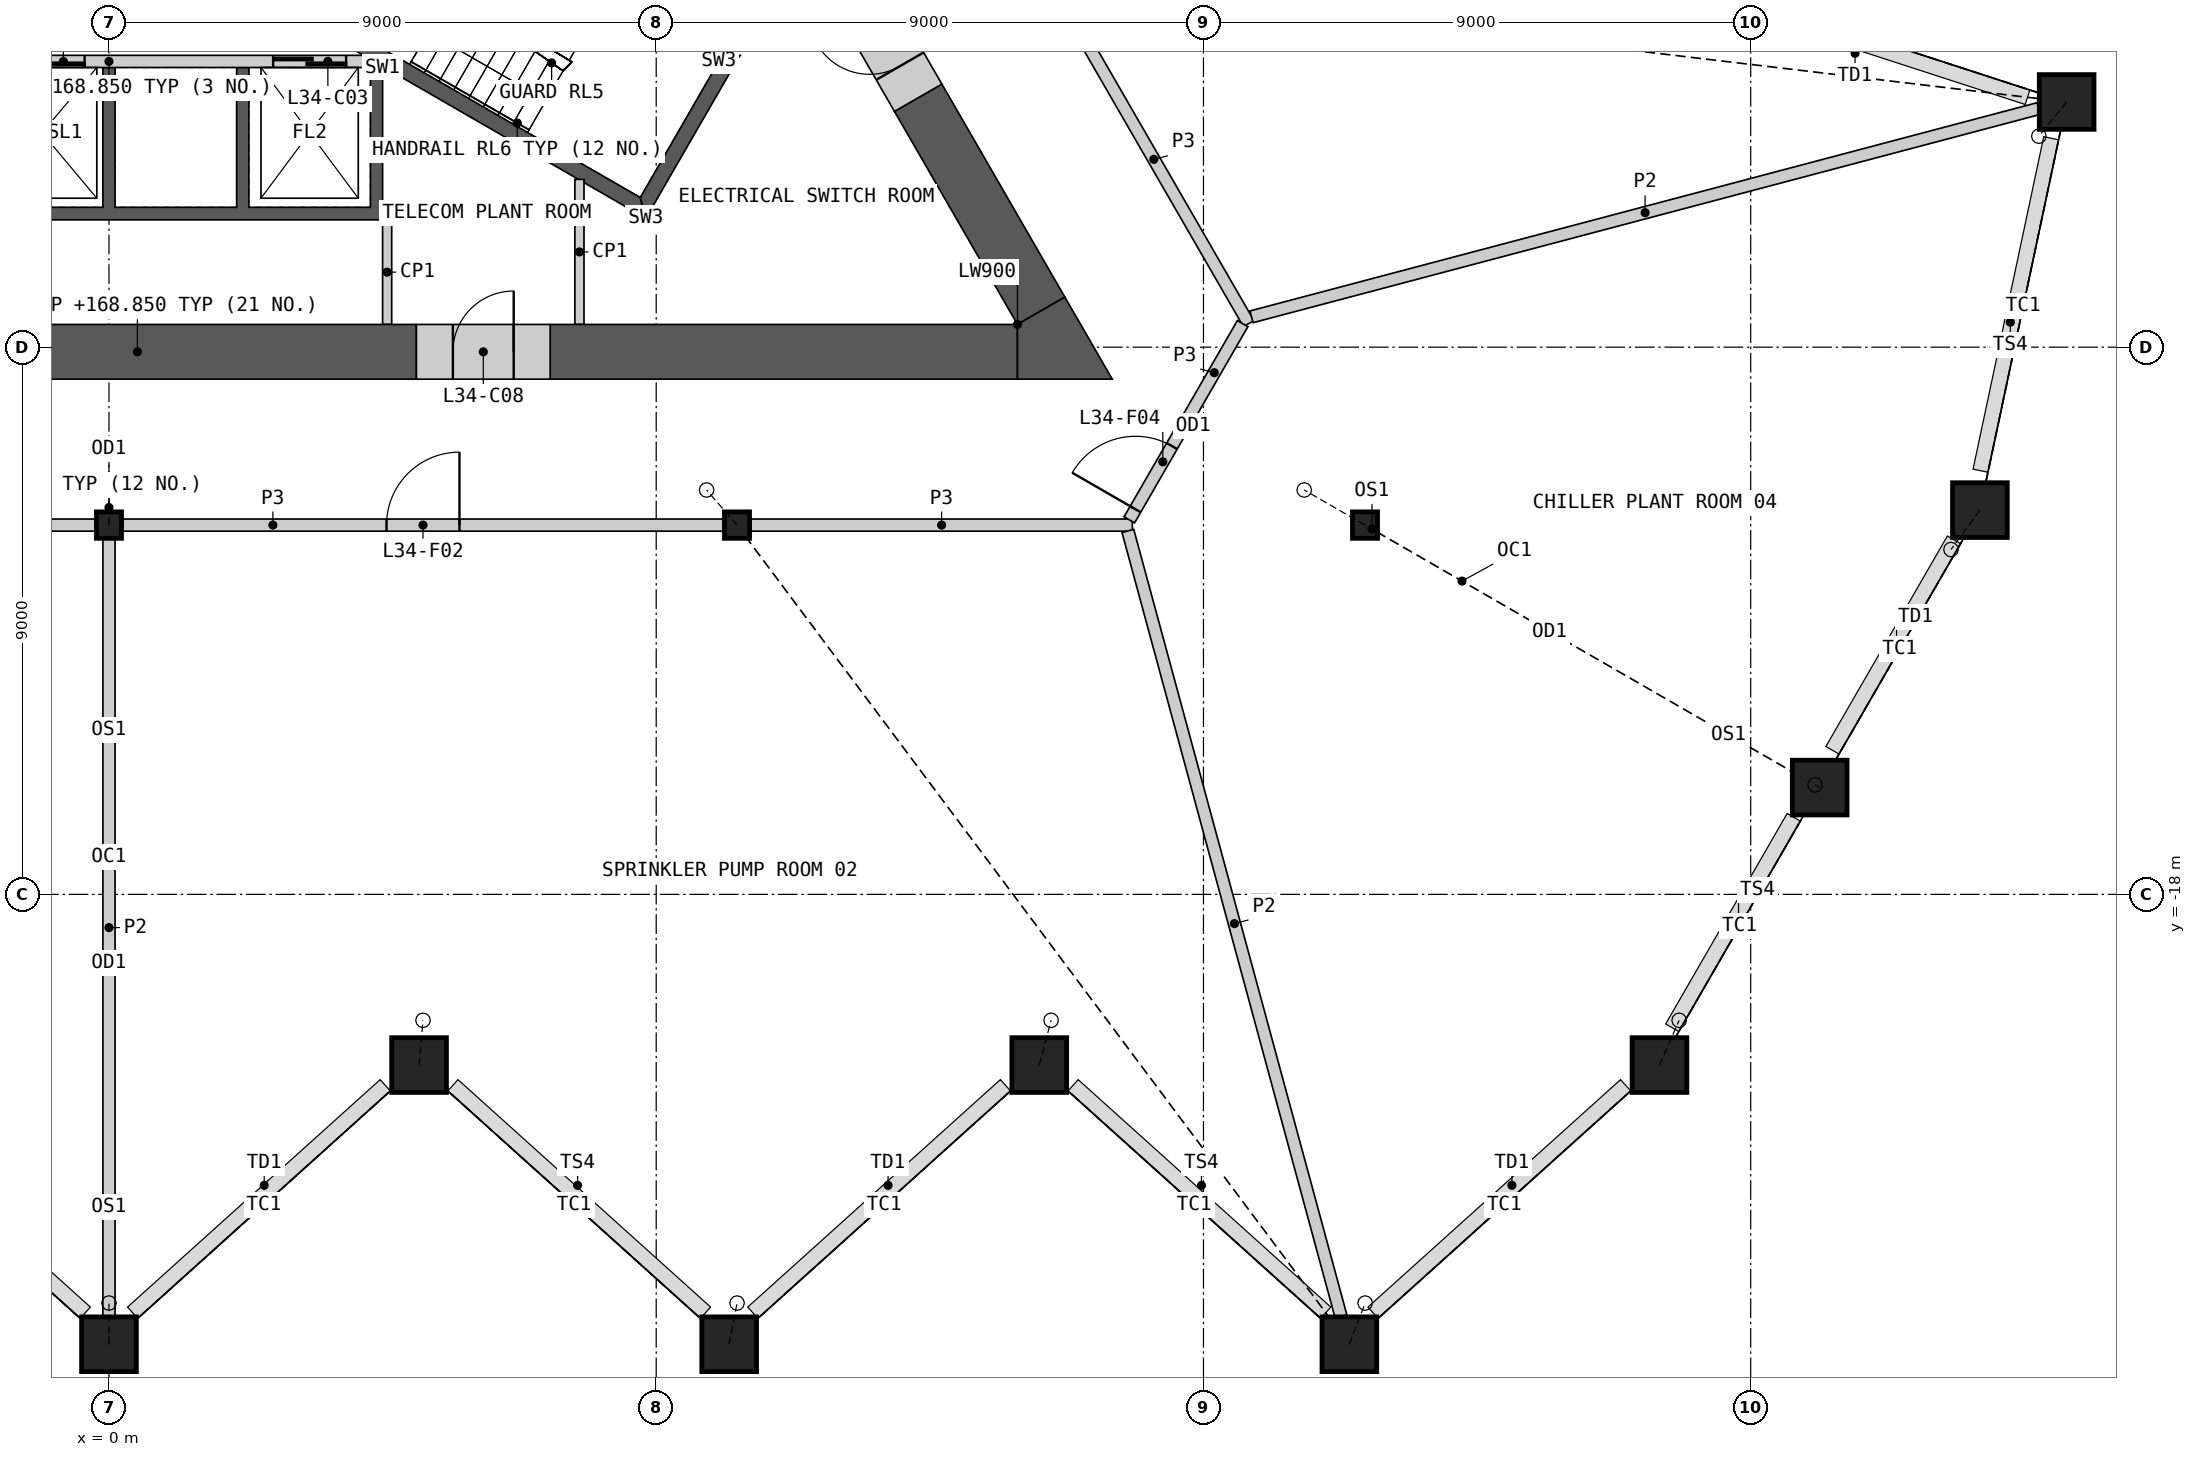
"""IFC4 building model, lengths in metres.
Left out: names, types, materials, properties, quantities, classifications, styles, units other than length and angle.
Written with IfcOpenShell. Run it as: python <this file> out.ifc"""

import sys

from ifc_helpers import new_model, si_unit, direction, frame, frame_2d, origin, origin_2d, place, context, subcontext, project, spatial, polyline, rectangle, hollow_rectangle, i_section, outline, extrude, element, fill, save


model = new_model("IFC4")
c1 = context("Model", 3, precision=1e-05, world=origin(), true_north=direction((0.0, 1.0)))
c2 = subcontext(c1, "Body", "Model", "MODEL_VIEW")
j1 = project(units=[si_unit("LENGTHUNIT", "METRE"), si_unit("PLANEANGLEUNIT", "RADIAN")], contexts=[c1])
p1 = place(None, origin())
s1 = spatial("IfcSite", under=j1, at=p1, CompositionType="ELEMENT")
p2 = place(p1, origin())
s2 = spatial("IfcBuilding", under=s1, at=p2, CompositionType="ELEMENT")
p3 = place(p2, frame((0.0, 0.0, 164.2)))
s3 = spatial("IfcBuildingStorey", under=s2, at=p3, CompositionType="ELEMENT", Elevation=164.2)
p4 = place(p3, frame((0.0, -25.399, 0.0), z_axis=(0.0, 0.134271063417, 0.990944641001), x_axis=(-1.0, 0.0, 0.0)))
e1 = element("IfcColumn", 1, at=p4, inside=s3, PredefinedType="COLUMN", context=c2, shape_type="SweptSolid", body=[
    extrude(hollow_rectangle(XDim=0.9, YDim=0.9, WallThickness=0.06, at=origin_2d()), frame((0.0, 0.0, 0.061)), (0.0, 0.0, 1.0), 4.924),
])
p5 = place(p3, frame((5.1, -20.807, 0.0), z_axis=(0.012848812001, 0.145587666803, 0.989261916433), x_axis=(-0.996128147691, 0.087913101289, 0.0)))
e2 = element("IfcColumn", 2, at=p5, inside=s3, PredefinedType="COLUMN", context=c2, shape_type="SweptSolid", body=[
    extrude(hollow_rectangle(XDim=0.9, YDim=0.9, WallThickness=0.06, at=origin_2d()), frame((0.0, 0.0, 0.066)), (0.0, 0.0, 1.0), 4.921),
])
p6 = place(p3, frame((10.2, -25.399, 0.0), z_axis=(0.025636135128, 0.134226933927, 0.990618957412), x_axis=(-0.982245501071, 0.187600041646, 0.0)))
e3 = element("IfcColumn", 3, at=p6, inside=s3, PredefinedType="COLUMN", context=c2, shape_type="SweptSolid", body=[
    extrude(hollow_rectangle(XDim=0.9, YDim=0.9, WallThickness=0.06, at=origin_2d()), frame((0.0, 0.0, 0.062)), (0.0, 0.0, 1.0), 4.923),
])
p7 = place(p3, frame((15.3, -20.807, 0.0), z_axis=(0.038424605206, 0.145492160916, 0.988612958051), x_axis=(-0.966849777203, 0.255345860204, 0.0)))
e4 = element("IfcColumn", 4, at=p7, inside=s3, PredefinedType="COLUMN", context=c2, shape_type="SweptSolid", body=[
    extrude(hollow_rectangle(XDim=0.9, YDim=0.9, WallThickness=0.06, at=origin_2d()), frame((0.0, 0.0, 0.069)), (0.0, 0.0, 1.0), 4.921),
])
p8 = place(p3, frame((20.4, -25.399, 0.0), z_axis=(0.051318190418, 0.13409414163, 0.989638926333), x_axis=(-0.93394282344, 0.3574224427, 0.0)))
e5 = element("IfcColumn", 5, at=p8, inside=s3, PredefinedType="COLUMN", context=c2, shape_type="SweptSolid", body=[
    extrude(hollow_rectangle(XDim=0.9, YDim=0.9, WallThickness=0.06, at=origin_2d()), frame((0.0, 0.0, 0.065)), (0.0, 0.0, 1.0), 4.922),
])
p9 = place(p3, frame((25.5, -20.807, 0.0), z_axis=(0.063925118443, 0.145301890638, 0.987320079715), x_axis=(-0.915332943749, 0.402697904251, 0.0)))
e6 = element("IfcColumn", 6, at=p9, inside=s3, PredefinedType="COLUMN", context=c2, shape_type="SweptSolid", body=[
    extrude(hollow_rectangle(XDim=0.9, YDim=0.9, WallThickness=0.06, at=origin_2d()), frame((0.0, 0.0, 0.072)), (0.0, 0.0, 1.0), 4.919),
])
p10 = place(p3, frame((28.135, -16.243, 0.0), z_axis=(-0.015134407055, 0.008738899558, 0.999847279017), x_axis=(-0.500044870432, -0.865999496279, 0.0)))
e7 = element("IfcColumn", 7, at=p10, inside=s3, PredefinedType="COLUMN", context=c2, shape_type="SweptSolid", body=[
    extrude(hollow_rectangle(XDim=0.9, YDim=0.9, WallThickness=0.06, at=origin_2d()), frame((0.0, 0.0, 0.008)), (0.0, 0.0, 1.0), 4.985),
])
p11 = place(p3, frame((30.769, -11.68, 0.0), z_axis=(-0.093862608604, -0.128042675117, 0.987317012947), x_axis=(0.806511174803, -0.59121884689, 0.0)))
e8 = element("IfcColumn", 8, at=p11, inside=s3, PredefinedType="COLUMN", context=c2, shape_type="SweptSolid", body=[
    extrude(hollow_rectangle(XDim=0.9, YDim=0.9, WallThickness=0.06, at=origin_2d()), frame((0.0, 0.0, 0.072)), (0.0, 0.0, 1.0), 4.919),
])
p12 = place(p3, frame((32.196, -4.967, 0.0), z_axis=(-0.090507303602, -0.111479097389, 0.989636720641), x_axis=(0.776350696847, -0.630301194276, 0.0)))
e9 = element("IfcColumn", 9, at=p12, inside=s3, PredefinedType="COLUMN", context=c2, shape_type="SweptSolid", body=[
    extrude(hollow_rectangle(XDim=0.9, YDim=0.9, WallThickness=0.06, at=origin_2d()), frame((0.0, 0.0, 0.065)), (0.0, 0.0, 1.0), 4.922),
])
p13 = place(p3, frame((0.0, -11.926, 0.0), z_axis=(0.0, 0.114716162252, 0.993398309903), x_axis=(-1.0, 0.0, 0.0)))
e10 = element("IfcColumn", 10, at=p13, inside=s3, PredefinedType="COLUMN", context=c2, shape_type="SweptSolid", body=[
    extrude(i_section(OverallWidth=0.412, OverallDepth=0.435, WebThickness=0.036, FlangeThickness=0.057, at=origin_2d()), frame((0.0, 0.0, 0.025)), (0.0, 0.0, 1.0), 4.983),
])
p14 = place(p3, frame((10.328, -11.926, 0.0), z_axis=(-0.098853266559, 0.114154284869, 0.988532665589), x_axis=(-0.755952685413, -0.654626257812, 0.0)))
e11 = element("IfcColumn", 11, at=p14, inside=s3, PredefinedType="COLUMN", context=c2, shape_type="SweptSolid", body=[
    extrude(i_section(OverallWidth=0.412, OverallDepth=0.435, WebThickness=0.036, FlangeThickness=0.057, at=origin_2d()), frame((0.0, 0.0, 0.033)), (0.0, 0.0, 1.0), 4.992),
])
p15 = place(p3, frame((20.657, -11.926, 0.0), z_axis=(-0.194870759968, 0.112516930499, 0.974353799839), x_axis=(-0.500027479704, -0.866009537788, 0.0)))
e12 = element("IfcColumn", 12, at=p15, inside=s3, PredefinedType="COLUMN", context=c2, shape_type="SweptSolid", body=[
    extrude(i_section(OverallWidth=0.412, OverallDepth=0.435, WebThickness=0.036, FlangeThickness=0.057, at=origin_2d()), frame((0.0, 0.0, 0.05)), (0.0, 0.0, 1.0), 5.031),
])
p16 = place(p3, origin())
e13 = element("IfcWall", 13, at=p16, inside=s3, PredefinedType="SHEAR", context=c2, shape_type="SweptSolid", body=[
    extrude(outline(polyline([(4.5, -4.4), (4.5, -6.906), (-4.5, -6.906), (-4.5, -4.4), (-4.3, -4.4), (-4.3, -6.7), (-2.3, -6.7), (-2.3, -4.4), (-2.1, -4.4), (-2.1, -6.7), (-0.1, -6.7), (-0.1, -4.4), (0.1, -4.4), (0.1, -6.7), (2.1, -6.7), (2.1, -4.4), (2.3, -4.4), (2.3, -6.7), (4.3, -6.7), (4.3, -4.4), (4.5, -4.4)])), origin(), (0.0, 0.0, 1.0), 4.65),
])
p17 = place(p3, frame((-4.187, -4.3, 0.0), z_axis=(0.0, 0.0, 1.0), x_axis=(1.0, 0.0, 0.0)))
e14 = element("IfcWall", 14, at=p17, inside=s3, PredefinedType="SOLIDWALL", context=c2, shape_type="SweptSolid", body=[
    extrude(rectangle(XDim=8.373, YDim=0.2, at=frame_2d((4.187, 0.0))), origin(), (0.0, 0.0, 1.0), 4.65),
])
p18 = place(p17, frame((0.287, 0.0, 0.0)))
e15 = element("IfcOpeningElement", 15, at=p18, cuts=e14, PredefinedType="OPENING", context=c2, shape_type="SweptSolid", body=[
    extrude(rectangle(XDim=1.2, YDim=2.1, at=frame_2d((0.6, 1.05))), frame((0.0, 0.11, 0.0), z_axis=(0.0, -1.0, 0.0), x_axis=(1.0, 0.0, 0.0)), (0.0, 0.0, 1.0), 0.22),
])
p19 = place(p17, frame((2.387, 0.0, 0.0)))
e16 = element("IfcOpeningElement", 16, at=p19, cuts=e14, PredefinedType="OPENING", context=c2, shape_type="SweptSolid", body=[
    extrude(rectangle(XDim=1.4, YDim=2.1, at=frame_2d((0.7, 1.05))), frame((0.0, 0.11, 0.0), z_axis=(0.0, -1.0, 0.0), x_axis=(1.0, 0.0, 0.0)), (0.0, 0.0, 1.0), 0.22),
])
p20 = place(p17, frame((6.887, 0.0, 0.0)))
e17 = element("IfcOpeningElement", 17, at=p20, cuts=e14, PredefinedType="OPENING", context=c2, shape_type="SweptSolid", body=[
    extrude(rectangle(XDim=1.2, YDim=2.1, at=frame_2d((0.6, 1.05))), frame((0.0, 0.11, 0.0), z_axis=(0.0, -1.0, 0.0), x_axis=(1.0, 0.0, 0.0)), (0.0, 0.0, 1.0), 0.22),
])
p21 = place(p3, origin())
e18 = element("IfcWall", 18, at=p21, inside=s3, PredefinedType="SHEAR", context=c2, shape_type="SweptSolid", body=[
    extrude(outline(polyline([(3.763, -3.956), (8.83, -6.881), (8.738, -6.539), (3.888, -3.739), (3.763, -3.956)])), origin(), (0.0, 0.0, 1.0), 4.65),
])
p22 = place(p3, origin())
e19 = element("IfcWall", 19, at=p22, inside=s3, PredefinedType="SHEAR", context=c2, shape_type="SweptSolid", body=[
    extrude(outline(polyline([(8.83, -6.881), (10.374, -4.206), (10.032, -4.298), (8.738, -6.539), (8.83, -6.881)])), origin(), (0.0, 0.0, 1.0), 4.65),
])
p23 = place(p3, origin())
e20 = element("IfcWall", 20, at=p23, inside=s3, PredefinedType="SHEAR", context=c2, shape_type="SweptSolid", body=[
    extrude(outline(polyline([(10.032, -4.298), (10.374, -4.206), (5.307, -1.281), (5.182, -1.498), (10.032, -4.298)])), origin(), (0.0, 0.0, 1.0), 4.65),
])
p24 = place(p3, frame((4.575, -6.906, 0.0), z_axis=(0.0, 0.0, 1.0), x_axis=(0.0, -1.0, 0.0)))
e21 = element("IfcWall", 21, at=p24, inside=s3, PredefinedType="PARTITIONING", context=c2, shape_type="SweptSolid", body=[
    extrude(rectangle(XDim=1.72, YDim=0.15, at=frame_2d((0.86, 0.0))), origin(), (0.0, 0.0, 1.0), 4.65),
])
p25 = place(p3, frame((7.737, -8.626, 0.0), z_axis=(0.0, 0.0, 1.0), x_axis=(0.0, 1.0, 0.0)))
e22 = element("IfcWall", 22, at=p25, inside=s3, PredefinedType="PARTITIONING", context=c2, shape_type="SweptSolid", body=[
    extrude(rectangle(XDim=2.386, YDim=0.15, at=frame_2d((1.193, 0.0))), origin(), (0.0, 0.0, 1.0), 4.65),
])
p26 = place(p3, frame((-4.121, -9.076, 0.0), z_axis=(0.0, 0.0, 1.0), x_axis=(1.0, 0.0, 0.0)))
e23 = element("IfcWall", 23, at=p26, inside=s3, PredefinedType="SHEAR", context=c2, shape_type="SweptSolid", body=[
    extrude(rectangle(XDim=9.177, YDim=0.9, at=frame_2d((4.588, 0.0))), origin(), (0.0, 0.0, 1.0), 4.65),
])
p27 = place(p3, frame((7.256, -9.076, 0.0), z_axis=(0.0, 0.0, 1.0), x_axis=(1.0, 0.0, 0.0)))
e24 = element("IfcWall", 24, at=p27, inside=s3, PredefinedType="SHEAR", context=c2, shape_type="SweptSolid", body=[
    extrude(rectangle(XDim=7.685, YDim=0.9, at=frame_2d((3.843, 0.0))), origin(), (0.0, 0.0, 1.0), 4.65),
])
p28 = place(p3, frame((15.331, -8.401, 0.0), z_axis=(0.0, 0.0, 1.0), x_axis=(-0.499974938593, 0.866039872511, 0.0)))
e25 = element("IfcWall", 25, at=p28, inside=s3, PredefinedType="SHEAR", context=c2, shape_type="SweptSolid", body=[
    extrude(rectangle(XDim=4.046, YDim=0.9, at=frame_2d((2.023, 0.0))), origin(), (0.0, 0.0, 1.0), 4.65),
])
p29 = place(p3, origin())
e26 = element("IfcWall", 26, at=p29, inside=s3, PredefinedType="SHEAR", context=c2, shape_type="SweptSolid", body=[
    extrude(outline(polyline([(14.941, -8.626), (15.721, -8.176), (16.5, -9.526), (14.941, -9.526), (14.941, -8.626)])), origin(), (0.0, 0.0, 1.0), 4.65),
])
p30 = place(p3, frame((5.056, -9.076, 0.0), z_axis=(0.0, 0.0, 1.0), x_axis=(1.0, 0.0, 0.0)))
e27 = element("IfcWall", 27, at=p30, inside=s3, PredefinedType="SHEAR", context=c2, shape_type="SweptSolid", body=[
    extrude(rectangle(XDim=2.2, YDim=0.9, at=frame_2d((1.1, 0.0))), origin(), (0.0, 0.0, 1.0), 4.65),
])
p31 = place(p30, frame((0.6, 0.0, 0.0)))
e28 = element("IfcOpeningElement", 28, at=p31, cuts=e27, PredefinedType="OPENING", context=c2, shape_type="SweptSolid", body=[
    extrude(rectangle(XDim=1.0, YDim=2.1, at=frame_2d((0.5, 1.05))), frame((0.0, 0.46, 0.0), z_axis=(0.0, -1.0, 0.0), x_axis=(1.0, 0.0, 0.0)), (0.0, 0.0, 1.0), 0.92),
])
p32 = place(p3, frame((13.308, -4.898, 0.0), z_axis=(0.0, 0.0, 1.0), x_axis=(-0.50002983664, 0.866008176907, 0.0)))
e29 = element("IfcWall", 29, at=p32, inside=s3, PredefinedType="SHEAR", context=c2, shape_type="SweptSolid", body=[
    extrude(rectangle(XDim=2.2, YDim=0.9, at=frame_2d((1.1, 0.0))), origin(), (0.0, 0.0, 1.0), 4.65),
])
p33 = place(p32, frame((0.6, 0.0, 0.0)))
e30 = element("IfcOpeningElement", 30, at=p33, cuts=e29, PredefinedType="OPENING", context=c2, shape_type="SweptSolid", body=[
    extrude(rectangle(XDim=1.0, YDim=2.1, at=frame_2d((0.5, 1.05))), frame((0.0, 0.46, 0.0), z_axis=(0.0, -1.0, 0.0), x_axis=(1.0, 0.0, 0.0)), (0.0, 0.0, 1.0), 0.92),
])
p34 = place(p3, frame((-10.101, -11.926, 0.0), z_axis=(0.0, 0.0, 1.0), x_axis=(1.0, 0.0, 0.0)))
e31 = element("IfcWall", 31, at=p34, inside=s3, PredefinedType="PARTITIONING", context=c2, shape_type="SweptSolid", body=[
    extrude(rectangle(XDim=9.874, YDim=0.2, at=frame_2d((4.937, 0.0))), origin(), (0.0, 0.0, 1.0), 4.65),
])
p35 = place(p34, frame((4.337, 0.0, 0.0)))
e32 = element("IfcOpeningElement", 32, at=p35, cuts=e31, PredefinedType="OPENING", context=c2, shape_type="SweptSolid", body=[
    extrude(rectangle(XDim=1.2, YDim=2.1, at=frame_2d((0.6, 1.05))), frame((0.0, 0.11, 0.0), z_axis=(0.0, -1.0, 0.0), x_axis=(1.0, 0.0, 0.0)), (0.0, 0.0, 1.0), 0.22),
])
p36 = place(p3, frame((0.227, -11.926, 0.0), z_axis=(0.0, 0.0, 1.0), x_axis=(1.0, 0.0, 0.0)))
e33 = element("IfcWall", 33, at=p36, inside=s3, PredefinedType="PARTITIONING", context=c2, shape_type="SweptSolid", body=[
    extrude(rectangle(XDim=9.874, YDim=0.2, at=frame_2d((4.937, 0.0))), origin(), (0.0, 0.0, 1.0), 4.65),
])
p37 = place(p36, frame((4.337, 0.0, 0.0)))
e34 = element("IfcOpeningElement", 34, at=p37, cuts=e33, PredefinedType="OPENING", context=c2, shape_type="SweptSolid", body=[
    extrude(rectangle(XDim=1.2, YDim=2.1, at=frame_2d((0.6, 1.05))), frame((0.0, 0.11, 0.0), z_axis=(0.0, -1.0, 0.0), x_axis=(1.0, 0.0, 0.0)), (0.0, 0.0, 1.0), 0.22),
])
p38 = place(p3, frame((10.556, -11.926, 0.0), z_axis=(0.0, 0.0, 1.0), x_axis=(1.0, 0.0, 0.0)))
e35 = element("IfcWall", 35, at=p38, inside=s3, PredefinedType="PARTITIONING", context=c2, shape_type="SweptSolid", body=[
    extrude(rectangle(XDim=6.275, YDim=0.2, at=frame_2d((3.137, 0.0))), origin(), (0.0, 0.0, 1.0), 4.65),
])
p39 = place(p3, frame((15.624, -3.209, 0.0), z_axis=(0.0, 0.0, 1.0), x_axis=(0.499997920671, -0.866026604282, 0.0)))
e36 = element("IfcWall", 36, at=p39, inside=s3, PredefinedType="PARTITIONING", context=c2, shape_type="SweptSolid", body=[
    extrude(rectangle(XDim=6.24, YDim=0.2, at=frame_2d((3.12, 0.0))), origin(), (0.0, 0.0, 1.0), 4.65),
])
p40 = place(p3, frame((16.781, -11.84, 0.0), z_axis=(0.0, 0.0, 1.0), x_axis=(0.499958791762, 0.866049194065, 0.0)))
e37 = element("IfcWall", 37, at=p40, inside=s3, PredefinedType="PARTITIONING", context=c2, shape_type="SweptSolid", body=[
    extrude(rectangle(XDim=3.726, YDim=0.2, at=frame_2d((1.863, 0.0))), origin(), (0.0, 0.0, 1.0), 4.65),
])
p41 = place(p40, frame((0.201, 0.0, 0.0)))
e38 = element("IfcOpeningElement", 38, at=p41, cuts=e37, PredefinedType="OPENING", context=c2, shape_type="SweptSolid", body=[
    extrude(rectangle(XDim=1.2, YDim=2.1, at=frame_2d((0.6, 1.05))), frame((0.0, 0.11, 0.0), z_axis=(0.0, -1.0, 0.0), x_axis=(1.0, 0.0, 0.0)), (0.0, 0.0, 1.0), 0.22),
])
p42 = place(p3, frame((18.791, -8.501, 0.0), z_axis=(0.0, 0.0, 1.0), x_axis=(0.966727906646, 0.255806869555, 0.0)))
e39 = element("IfcWall", 39, at=p42, inside=s3, PredefinedType="PARTITIONING", context=c2, shape_type="SweptSolid", body=[
    extrude(rectangle(XDim=13.391, YDim=0.2, at=frame_2d((6.696, 0.0))), origin(), (0.0, 0.0, 1.0), 4.65),
])
p43 = place(p3, frame((16.757, -12.023, 0.0), z_axis=(0.0, 0.0, 1.0), x_axis=(0.261845290604, -0.965109860994, 0.0)))
e40 = element("IfcWall", 40, at=p43, inside=s3, PredefinedType="PARTITIONING", context=c2, shape_type="SweptSolid", body=[
    extrude(rectangle(XDim=13.384, YDim=0.2, at=frame_2d((6.692, 0.0))), origin(), (0.0, 0.0, 1.0), 4.65),
])
p44 = place(p3, frame((0.0, -24.939, 0.0), z_axis=(0.0, 0.0, 1.0), x_axis=(0.0, 1.0, 0.0)))
e41 = element("IfcWall", 41, at=p44, inside=s3, PredefinedType="PARTITIONING", context=c2, shape_type="SweptSolid", body=[
    extrude(rectangle(XDim=12.785, YDim=0.2, at=frame_2d((6.393, 0.0))), origin(), (0.0, 0.0, 1.0), 4.65),
])
p45 = place(p19, origin())
e42 = element("IfcDoor", 42, at=p45, inside=s3, OperationType="SLIDING_TO_LEFT", PredefinedType="DOOR", context=c2, shape_type="SweptSolid", body=[
    extrude(rectangle(XDim=1.4, YDim=2.1, at=frame_2d((0.7, 1.05))), frame((0.0, 0.025, 0.0), z_axis=(0.0, -1.0, 0.0), x_axis=(1.0, 0.0, 0.0)), (0.0, 0.0, 1.0), 0.05),
])
fill(e16, e42)
p46 = place(p20, origin())
e43 = element("IfcDoor", 43, at=p46, inside=s3, OperationType="SLIDING_TO_LEFT", PredefinedType="DOOR", context=c2, shape_type="SweptSolid", body=[
    extrude(rectangle(XDim=1.2, YDim=2.1, at=frame_2d((0.6, 1.05))), frame((0.0, 0.025, 0.0), z_axis=(0.0, -1.0, 0.0), x_axis=(1.0, 0.0, 0.0)), (0.0, 0.0, 1.0), 0.05),
])
fill(e17, e43)
p47 = place(p31, origin())
e44 = element("IfcDoor", 44, at=p47, inside=s3, OperationType="SINGLE_SWING_RIGHT", PredefinedType="DOOR", context=c2, shape_type="SweptSolid", body=[
    extrude(rectangle(XDim=1.0, YDim=2.1, at=frame_2d((0.5, 1.05))), frame((0.0, 0.205, 0.0), z_axis=(0.0, -1.0, 0.0), x_axis=(1.0, 0.0, 0.0)), (0.0, 0.0, 1.0), 0.05),
])
fill(e28, e44)
p48 = place(p33, origin())
e45 = element("IfcDoor", 45, at=p48, inside=s3, OperationType="SINGLE_SWING_RIGHT", PredefinedType="DOOR", context=c2, shape_type="SweptSolid", body=[
    extrude(rectangle(XDim=1.0, YDim=2.1, at=frame_2d((0.5, 1.05))), frame((0.0, 0.205, 0.0), z_axis=(0.0, -1.0, 0.0), x_axis=(1.0, 0.0, 0.0)), (0.0, 0.0, 1.0), 0.05),
])
fill(e30, e45)
p49 = place(p37, origin())
e46 = element("IfcDoor", 46, at=p49, inside=s3, OperationType="SINGLE_SWING_RIGHT", PredefinedType="DOOR", context=c2, shape_type="SweptSolid", body=[
    extrude(rectangle(XDim=1.2, YDim=2.1, at=frame_2d((0.6, 1.05))), frame((0.0, 0.025, 0.0), z_axis=(0.0, -1.0, 0.0), x_axis=(1.0, 0.0, 0.0)), (0.0, 0.0, 1.0), 0.05),
])
fill(e34, e46)
p50 = place(p41, origin())
e47 = element("IfcDoor", 47, at=p50, inside=s3, OperationType="SINGLE_SWING_LEFT", PredefinedType="DOOR", context=c2, shape_type="SweptSolid", body=[
    extrude(rectangle(XDim=1.2, YDim=2.1, at=frame_2d((0.6, 1.05))), frame((0.0, 0.025, 0.0), z_axis=(0.0, -1.0, 0.0), x_axis=(1.0, 0.0, 0.0)), (0.0, 0.0, 1.0), 0.05),
])
fill(e38, e47)
save(model, sys.argv[1])
